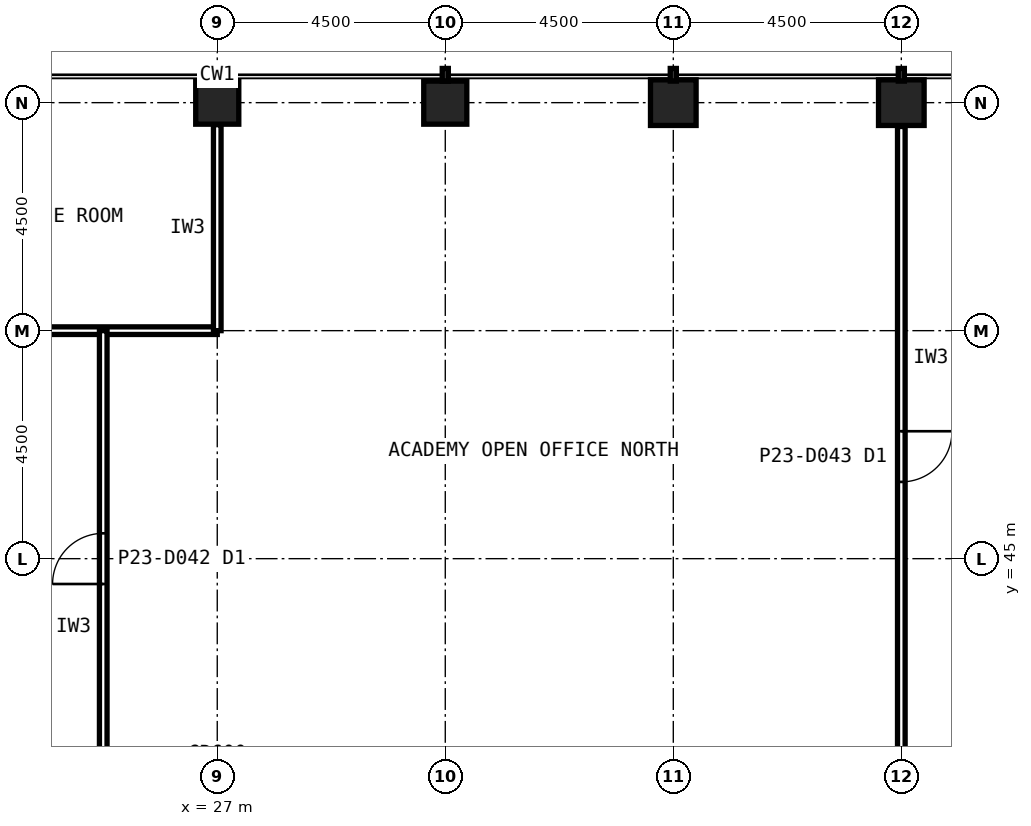
"""IFC4 building model, lengths in metres.
Left out: names, types, materials, properties, quantities, classifications, styles, units other than length and angle.
Written with IfcOpenShell. Run it as: python <this file> out.ifc"""

import sys

from ifc_helpers import new_model, si_unit, direction, frame, frame_2d, origin, origin_2d, place, context, subcontext, project, spatial, rectangle, hollow_rectangle, extrude, element, fill, save


model = new_model("IFC4")
c1 = context("Model", 3, precision=1e-05, world=origin(), true_north=direction((0.0, 1.0)))
c2 = subcontext(c1, "Body", "Model", "MODEL_VIEW")
j1 = project(units=[si_unit("LENGTHUNIT", "METRE"), si_unit("PLANEANGLEUNIT", "RADIAN")], contexts=[c1])
p1 = place(None, origin())
s1 = spatial("IfcSite", under=j1, at=p1, CompositionType="ELEMENT")
p2 = place(p1, origin())
s2 = spatial("IfcBuilding", under=s1, at=p2, CompositionType="ELEMENT")
p3 = place(p2, frame((0.0, 0.0, 96.2)))
s3 = spatial("IfcBuildingStorey", under=s2, at=p3, CompositionType="ELEMENT", Elevation=96.2)
p4 = place(p3, frame((40.5, 54.0, 0.0), z_axis=(0.0, 0.0, 1.0), x_axis=(1.0, 0.0, 0.0)))
e1 = element("IfcColumn", 1, at=p4, inside=s3, PredefinedType="COLUMN", context=c2, shape_type="SweptSolid", body=[
    extrude(hollow_rectangle(XDim=0.85, YDim=0.85, WallThickness=0.05, at=origin_2d()), origin(), (0.0, 0.0, 1.0), 4.2),
])
p5 = place(p3, frame((36.0, 54.0, 0.0), z_axis=(0.0, 0.0, 1.0), x_axis=(1.0, 0.0, 0.0)))
e2 = element("IfcColumn", 2, at=p5, inside=s3, PredefinedType="COLUMN", context=c2, shape_type="SweptSolid", body=[
    extrude(hollow_rectangle(XDim=0.9, YDim=0.9, WallThickness=0.063, at=origin_2d()), origin(), (0.0, 0.0, 1.0), 4.2),
])
for number, where, z_axis, x_axis in (
    (3, (31.5, 54.0, 0.0), (0.0, 0.0, 1.0), (1.0, 0.0, 0.0)),
    (4, (27.0, 54.0, 0.0), (0.0, 0.0, 1.0), (1.0, 0.0, 0.0)),
):
    element("IfcColumn", number, at=place(p3, frame(where, z_axis=z_axis, x_axis=x_axis)), inside=s3, PredefinedType="COLUMN", context=c2, shape_type="SweptSolid", body=[
        extrude(hollow_rectangle(XDim=0.8, YDim=0.8, WallThickness=0.045, at=origin_2d()), origin(), (0.0, 0.0, 1.0), 4.2),
    ])
p6 = place(p3, frame((42.3, 42.3, 0.0), z_axis=(0.0, 0.0, 1.0), x_axis=(-1.0, 0.0, 0.0)))
e5 = element("IfcWall", 5, at=p6, inside=s3, PredefinedType="PARTITIONING", context=c2, shape_type="SweptSolid", body=[
    extrude(rectangle(XDim=30.6, YDim=0.15, at=frame_2d((15.3, 0.0))), origin(), (0.0, 0.0, 1.0), 4.04),
])
p7 = place(p6, frame((14.8, 0.0, 0.0)))
e6 = element("IfcOpeningElement", 6, at=p7, cuts=e5, PredefinedType="OPENING", context=c2, shape_type="SweptSolid", body=[
    extrude(rectangle(XDim=1.0, YDim=2.1, at=frame_2d((0.5, 1.05))), frame((0.0, 0.085, 0.0), z_axis=(0.0, -1.0, 0.0), x_axis=(1.0, 0.0, 0.0)), (0.0, 0.0, 1.0), 0.17),
])
p8 = place(p3, frame((18.0, 49.5, 0.0), z_axis=(0.0, 0.0, 1.0), x_axis=(1.0, 0.0, 0.0)))
e7 = element("IfcWall", 7, at=p8, inside=s3, PredefinedType="PARTITIONING", context=c2, shape_type="SweptSolid", body=[
    extrude(rectangle(XDim=9.0, YDim=0.15, at=frame_2d((4.5, 0.0))), origin(), (0.0, 0.0, 1.0), 4.04),
])
p9 = place(p8, frame((4.0, 0.0, 0.0)))
e8 = element("IfcOpeningElement", 8, at=p9, cuts=e7, PredefinedType="OPENING", context=c2, shape_type="SweptSolid", body=[
    extrude(rectangle(XDim=1.0, YDim=2.1, at=frame_2d((0.5, 1.05))), frame((0.0, 0.085, 0.0), z_axis=(0.0, -1.0, 0.0), x_axis=(1.0, 0.0, 0.0)), (0.0, 0.0, 1.0), 0.17),
])
p10 = place(p3, frame((27.0, 49.5, 0.0), z_axis=(0.0, 0.0, 1.0), x_axis=(0.0, 1.0, 0.0)))
e9 = element("IfcWall", 9, at=p10, inside=s3, PredefinedType="PARTITIONING", context=c2, shape_type="SweptSolid", body=[
    extrude(rectangle(XDim=4.09, YDim=0.15, at=frame_2d((2.045, 0.0))), origin(), (0.0, 0.0, 1.0), 3.189),
])
p11 = place(p3, frame((40.5, 53.555, 0.0), z_axis=(0.0, 0.0, 1.0), x_axis=(0.0, -1.0, 0.0)))
e10 = element("IfcWall", 10, at=p11, inside=s3, PredefinedType="PARTITIONING", context=c2, shape_type="SweptSolid", body=[
    extrude(rectangle(XDim=11.255, YDim=0.15, at=frame_2d((5.627, 0.0))), origin(), (0.0, 0.0, 1.0), 3.189),
])
p12 = place(p11, frame((5.127, 0.0, 0.0)))
e11 = element("IfcOpeningElement", 11, at=p12, cuts=e10, PredefinedType="OPENING", context=c2, shape_type="SweptSolid", body=[
    extrude(rectangle(XDim=1.0, YDim=2.1, at=frame_2d((0.5, 1.05))), frame((0.0, 0.085, 0.0), z_axis=(0.0, -1.0, 0.0), x_axis=(1.0, 0.0, 0.0)), (0.0, 0.0, 1.0), 0.17),
])
p13 = place(p3, frame((24.75, 42.3, 0.0), z_axis=(0.0, 0.0, 1.0), x_axis=(0.0, 1.0, 0.0)))
e12 = element("IfcWall", 12, at=p13, inside=s3, PredefinedType="PARTITIONING", context=c2, shape_type="SweptSolid", body=[
    extrude(rectangle(XDim=7.2, YDim=0.15, at=frame_2d((3.6, 0.0))), origin(), (0.0, 0.0, 1.0), 4.04),
])
p14 = place(p13, frame((3.1, 0.0, 0.0)))
e13 = element("IfcOpeningElement", 13, at=p14, cuts=e12, PredefinedType="OPENING", context=c2, shape_type="SweptSolid", body=[
    extrude(rectangle(XDim=1.0, YDim=2.1, at=frame_2d((0.5, 1.05))), frame((0.0, 0.085, 0.0), z_axis=(0.0, -1.0, 0.0), x_axis=(1.0, 0.0, 0.0)), (0.0, 0.0, 1.0), 0.17),
])
p15 = place(p7, origin())
e14 = element("IfcDoor", 14, at=p15, inside=s3, OperationType="SINGLE_SWING_LEFT", PredefinedType="DOOR", context=c2, shape_type="SweptSolid", body=[
    extrude(rectangle(XDim=1.0, YDim=2.1, at=frame_2d((0.5, 1.05))), frame((0.0, 0.025, 0.0), z_axis=(0.0, -1.0, 0.0), x_axis=(1.0, 0.0, 0.0)), (0.0, 0.0, 1.0), 0.05),
])
fill(e6, e14)
p16 = place(p12, origin())
e15 = element("IfcDoor", 15, at=p16, inside=s3, OperationType="SINGLE_SWING_LEFT", PredefinedType="DOOR", context=c2, shape_type="SweptSolid", body=[
    extrude(rectangle(XDim=1.0, YDim=2.1, at=frame_2d((0.5, 1.05))), frame((0.0, 0.025, 0.0), z_axis=(0.0, -1.0, 0.0), x_axis=(1.0, 0.0, 0.0)), (0.0, 0.0, 1.0), 0.05),
])
fill(e11, e15)
p17 = place(p14, origin())
e16 = element("IfcDoor", 16, at=p17, inside=s3, OperationType="SINGLE_SWING_LEFT", PredefinedType="DOOR", context=c2, shape_type="SweptSolid", body=[
    extrude(rectangle(XDim=1.0, YDim=2.1, at=frame_2d((0.5, 1.05))), frame((0.0, 0.025, 0.0), z_axis=(0.0, -1.0, 0.0), x_axis=(1.0, 0.0, 0.0)), (0.0, 0.0, 1.0), 0.05),
])
fill(e13, e16)
save(model, sys.argv[1])
